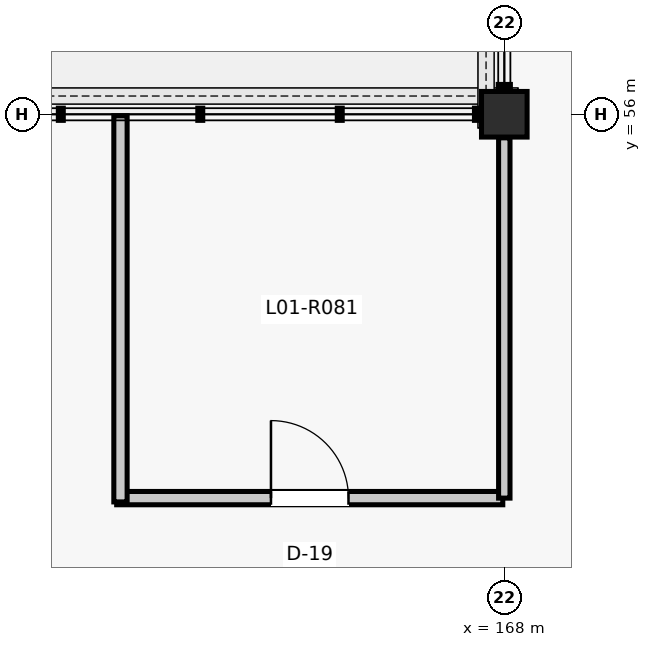
"""IFC4 building model, lengths in metres.
Left out: names, types, materials, properties, quantities, classifications, styles, units other than length and angle.
Written with IfcOpenShell. Run it as: python <this file> out.ifc"""

import sys

from ifc_helpers import new_model, si_unit, direction, frame, frame_2d, origin, origin_2d, place, context, subcontext, project, spatial, rectangle, extrude, element, fill, save


model = new_model("IFC4")
c1 = context("Model", 3, precision=1e-05, world=origin(), true_north=direction((0.0, 1.0)))
c2 = subcontext(c1, "Body", "Model", "MODEL_VIEW")
j1 = project(units=[si_unit("LENGTHUNIT", "METRE"), si_unit("PLANEANGLEUNIT", "RADIAN")], contexts=[c1])
p1 = place(None, origin())
s1 = spatial("IfcSite", under=j1, at=p1, CompositionType="ELEMENT")
p2 = place(p1, origin())
s2 = spatial("IfcBuilding", under=s1, at=p2, CompositionType="ELEMENT")
p3 = place(p2, frame((0.0, 0.0, 5.28)))
s3 = spatial("IfcBuildingStorey", under=s2, at=p3, CompositionType="ELEMENT", Elevation=5.28)
p4 = place(p3, frame((168.0, 56.0, 0.0), z_axis=(0.0, 0.0, 1.0), x_axis=(1.0, 0.0, 0.0)))
e1 = element("IfcColumn", 1, at=p4, inside=s3, PredefinedType="COLUMN", context=c2, shape_type="SweptSolid", body=[
    extrude(rectangle(XDim=0.6, YDim=0.6, at=origin_2d()), origin(), (0.0, 0.0, 1.0), 4.62),
])
p5 = place(p3, frame((162.9, 50.95, 0.0), z_axis=(0.0, 0.0, 1.0), x_axis=(1.0, 0.0, 0.0)))
e2 = element("IfcWall", 2, at=p5, inside=s3, PredefinedType="PARTITIONING", context=c2, shape_type="SweptSolid", body=[
    extrude(rectangle(XDim=5.08, YDim=0.175, at=frame_2d((2.54, 0.0))), origin(), (0.0, 0.0, 1.0), 3.851),
])
p6 = place(p5, frame((2.03, 0.0, 0.0)))
e3 = element("IfcOpeningElement", 3, at=p6, cuts=e2, PredefinedType="OPENING", context=c2, shape_type="SweptSolid", body=[
    extrude(rectangle(XDim=1.02, YDim=2.2, at=frame_2d((0.51, 1.1))), frame((0.0, 0.097, 0.0), z_axis=(0.0, -1.0, 0.0), x_axis=(1.0, 0.0, 0.0)), (0.0, 0.0, 1.0), 0.195),
])
p7 = place(p3, frame((162.95, 50.9, 0.0), z_axis=(0.0, 0.0, 1.0), x_axis=(0.0, 1.0, 0.0)))
e4 = element("IfcWall", 4, at=p7, inside=s3, PredefinedType="PARTITIONING", context=c2, shape_type="SweptSolid", body=[
    extrude(rectangle(XDim=5.08, YDim=0.175, at=frame_2d((2.54, 0.0))), origin(), (0.0, 0.0, 1.0), 3.903),
])
p8 = place(p3, frame((168.0, 50.95, 0.0), z_axis=(0.0, 0.0, 1.0), x_axis=(0.0, 1.0, 0.0)))
e5 = element("IfcWall", 5, at=p8, inside=s3, PredefinedType="PARTITIONING", context=c2, shape_type="SweptSolid", body=[
    extrude(rectangle(XDim=4.74, YDim=0.15, at=frame_2d((2.37, 0.0))), origin(), (0.0, 0.0, 1.0), 3.851),
])
p9 = place(p6, origin())
e6 = element("IfcDoor", 6, at=p9, inside=s3, OperationType="SINGLE_SWING_LEFT", PredefinedType="DOOR", context=c2, shape_type="SweptSolid", body=[
    extrude(rectangle(XDim=1.02, YDim=2.2, at=frame_2d((0.51, 1.1))), frame((0.0, 0.025, 0.0), z_axis=(0.0, -1.0, 0.0), x_axis=(1.0, 0.0, 0.0)), (0.0, 0.0, 1.0), 0.05),
])
fill(e3, e6)
save(model, sys.argv[1])
